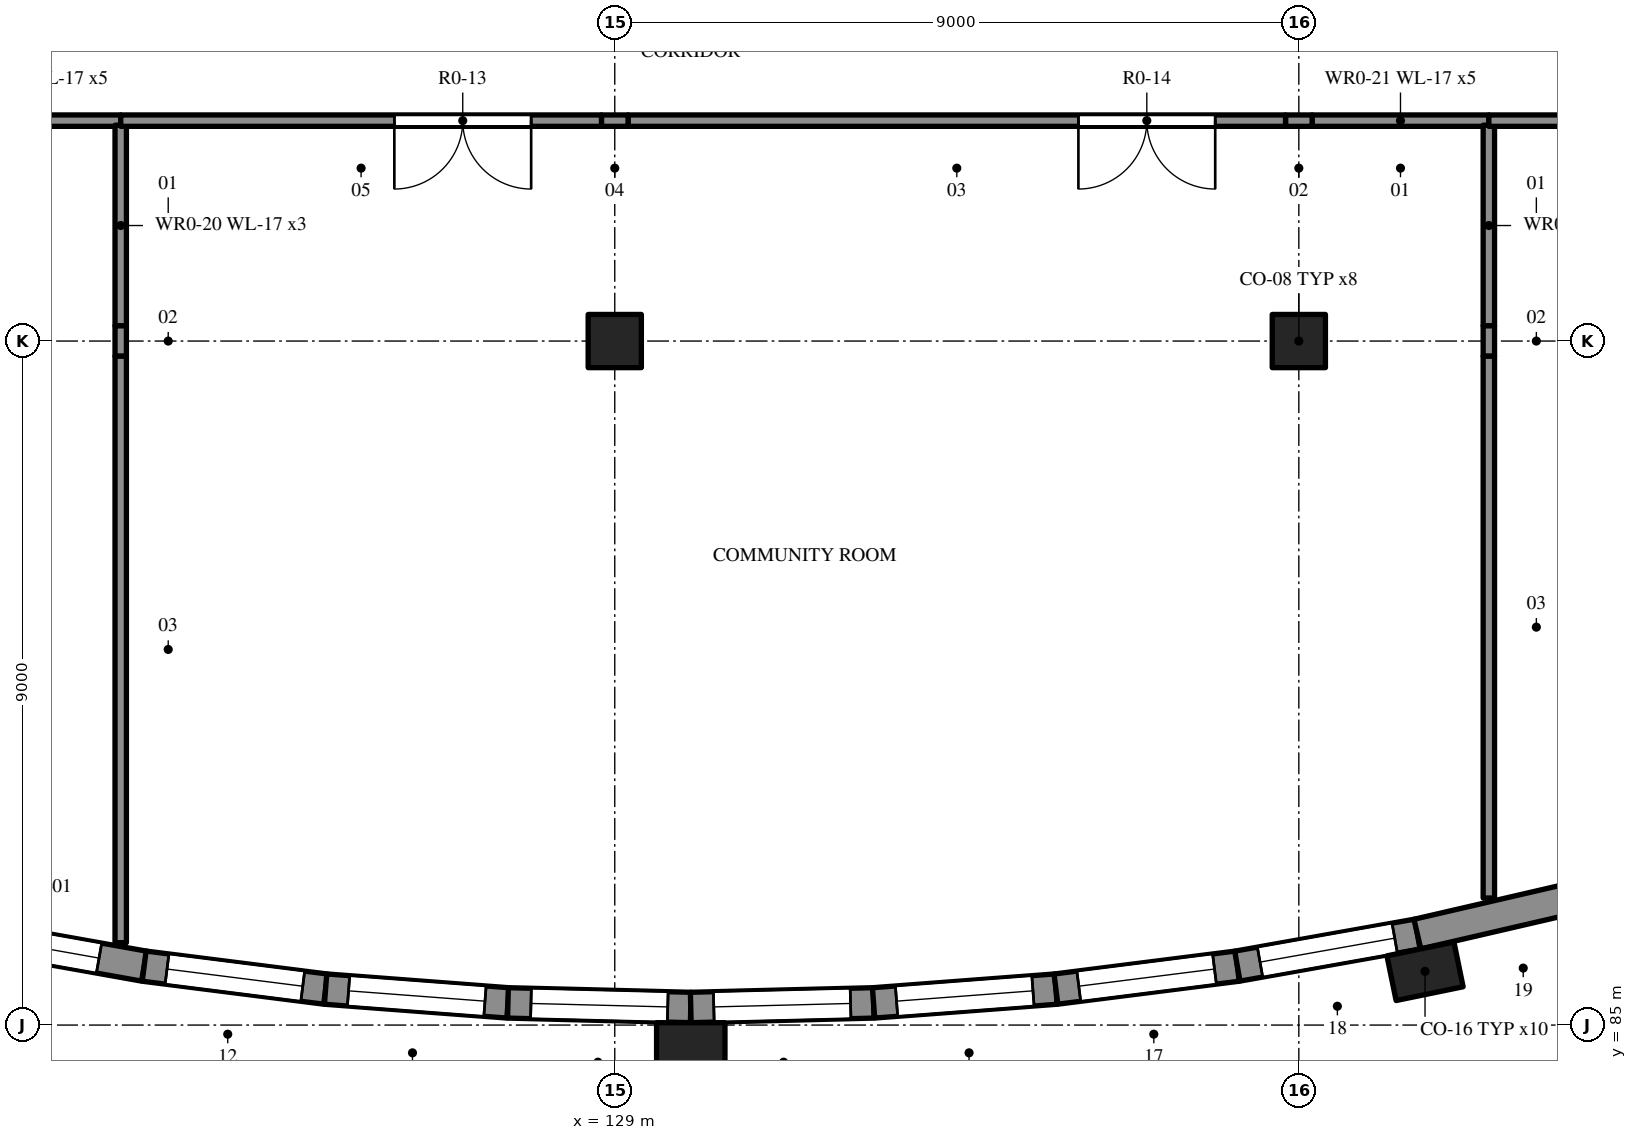
"""IFC4 building model, lengths in metres.
Left out: names, types, materials, properties, quantities, classifications, styles, units other than length and angle.
Written with IfcOpenShell. Run it as: python <this file> out.ifc"""

import sys

from ifc_helpers import new_model, si_unit, direction, frame, frame_2d, origin, origin_2d, place, context, subcontext, project, spatial, rectangle, extrude, element, fill, save


model = new_model("IFC4")
c1 = context("Model", 3, precision=1e-05, world=origin(), true_north=direction((0.0, 1.0)))
c2 = subcontext(c1, "Body", "Model", "MODEL_VIEW")
j1 = project(units=[si_unit("LENGTHUNIT", "METRE"), si_unit("PLANEANGLEUNIT", "RADIAN")], contexts=[c1])
p1 = place(None, origin())
s1 = spatial("IfcSite", under=j1, at=p1, CompositionType="ELEMENT")
p2 = place(p1, origin())
s2 = spatial("IfcBuilding", under=s1, at=p2, CompositionType="ELEMENT")
p3 = place(p2, origin())
s3 = spatial("IfcBuildingStorey", under=s2, at=p3, CompositionType="ELEMENT", Elevation=0.0)
for number, where, z_axis, x_axis in (
    (1, (129.0, 94.0, -0.25), (0.0, 0.0, 1.0), (1.0, 0.0, 0.0)),
    (2, (138.0, 94.0, -0.25), (0.0, 0.0, 1.0), (1.0, 0.0, 0.0)),
):
    element("IfcColumn", number, at=place(p3, frame(where, z_axis=z_axis, x_axis=x_axis)), inside=s3, PredefinedType="COLUMN", context=c2, shape_type="SweptSolid", body=[
        extrude(rectangle(XDim=0.7, YDim=0.7, at=origin_2d()), origin(), (0.0, 0.0, 1.0), 5.37),
    ])
p4 = place(p3, frame((120.44, 86.197, -0.25), z_axis=(0.0, 0.0, 1.0), x_axis=(0.984524011381, -0.175249738987, 0.0)))
e3 = element("IfcWall", 3, at=p4, inside=s3, PredefinedType="SOLIDWALL", context=c2, shape_type="SweptSolid", body=[
    extrude(rectangle(XDim=2.406, YDim=0.4, at=frame_2d((1.203, 0.0))), origin(), (0.0, 0.0, 1.0), 5.65),
])
p5 = place(p4, frame((0.303, 0.0, 1.15)))
e4 = element("IfcOpeningElement", 4, at=p5, cuts=e3, PredefinedType="OPENING", context=c2, shape_type="SweptSolid", body=[
    extrude(rectangle(XDim=1.5, YDim=2.1, at=frame_2d((0.75, 1.05))), frame((0.0, 0.21, 0.0), z_axis=(0.0, -1.0, 0.0), x_axis=(1.0, 0.0, 0.0)), (0.0, 0.0, 1.0), 0.42),
])
p6 = place(p3, frame((122.809, 85.775, -0.25), z_axis=(0.0, 0.0, 1.0), x_axis=(0.99208939311, -0.125533406227, 0.0)))
e5 = element("IfcWall", 5, at=p6, inside=s3, PredefinedType="SOLIDWALL", context=c2, shape_type="SweptSolid", body=[
    extrude(rectangle(XDim=2.406, YDim=0.4, at=frame_2d((1.203, 0.0))), origin(), (0.0, 0.0, 1.0), 5.65),
])
p7 = place(p6, frame((0.303, 0.0, 1.25)))
e6 = element("IfcOpeningElement", 6, at=p7, cuts=e5, PredefinedType="OPENING", context=c2, shape_type="SweptSolid", body=[
    extrude(rectangle(XDim=1.8, YDim=2.1, at=frame_2d((0.9, 1.05))), frame((0.0, 0.21, 0.0), z_axis=(0.0, -1.0, 0.0), x_axis=(1.0, 0.0, 0.0)), (0.0, 0.0, 1.0), 0.42),
])
p8 = place(p3, frame((125.196, 85.473, -0.25), z_axis=(0.0, 0.0, 1.0), x_axis=(0.997146276918, -0.075493724435, 0.0)))
e7 = element("IfcWall", 7, at=p8, inside=s3, PredefinedType="SOLIDWALL", context=c2, shape_type="SweptSolid", body=[
    extrude(rectangle(XDim=2.406, YDim=0.4, at=frame_2d((1.203, 0.0))), origin(), (0.0, 0.0, 1.0), 5.65),
])
p9 = place(p8, frame((0.303, 0.0, 1.25)))
e8 = element("IfcOpeningElement", 8, at=p9, cuts=e7, PredefinedType="OPENING", context=c2, shape_type="SweptSolid", body=[
    extrude(rectangle(XDim=1.8, YDim=2.1, at=frame_2d((0.9, 1.05))), frame((0.0, 0.21, 0.0), z_axis=(0.0, -1.0, 0.0), x_axis=(1.0, 0.0, 0.0)), (0.0, 0.0, 1.0), 0.42),
])
p10 = place(p3, frame((127.595, 85.292, -0.25), z_axis=(0.0, 0.0, 1.0), x_axis=(0.999683321759, -0.025164582196, 0.0)))
e9 = element("IfcWall", 9, at=p10, inside=s3, PredefinedType="SOLIDWALL", context=c2, shape_type="SweptSolid", body=[
    extrude(rectangle(XDim=2.406, YDim=0.4, at=frame_2d((1.203, 0.0))), origin(), (0.0, 0.0, 1.0), 5.65),
])
p11 = place(p10, frame((0.303, 0.0, 1.25)))
e10 = element("IfcOpeningElement", 10, at=p11, cuts=e9, PredefinedType="OPENING", context=c2, shape_type="SweptSolid", body=[
    extrude(rectangle(XDim=1.8, YDim=2.1, at=frame_2d((0.9, 1.05))), frame((0.0, 0.21, 0.0), z_axis=(0.0, -1.0, 0.0), x_axis=(1.0, 0.0, 0.0)), (0.0, 0.0, 1.0), 0.42),
])
p12 = place(p3, frame((130.0, 85.231, -0.25), z_axis=(0.0, 0.0, 1.0), x_axis=(0.999683321759, 0.025164582196, 0.0)))
e11 = element("IfcWall", 11, at=p12, inside=s3, PredefinedType="SOLIDWALL", context=c2, shape_type="SweptSolid", body=[
    extrude(rectangle(XDim=2.406, YDim=0.4, at=frame_2d((1.203, 0.0))), origin(), (0.0, 0.0, 1.0), 5.65),
])
p13 = place(p12, frame((0.303, 0.0, 1.25)))
e12 = element("IfcOpeningElement", 12, at=p13, cuts=e11, PredefinedType="OPENING", context=c2, shape_type="SweptSolid", body=[
    extrude(rectangle(XDim=1.8, YDim=2.1, at=frame_2d((0.9, 1.05))), frame((0.0, 0.21, 0.0), z_axis=(0.0, -1.0, 0.0), x_axis=(1.0, 0.0, 0.0)), (0.0, 0.0, 1.0), 0.42),
])
p14 = place(p3, frame((132.405, 85.292, -0.25), z_axis=(0.0, 0.0, 1.0), x_axis=(0.997146276918, 0.075493724435, 0.0)))
e13 = element("IfcWall", 13, at=p14, inside=s3, PredefinedType="SOLIDWALL", context=c2, shape_type="SweptSolid", body=[
    extrude(rectangle(XDim=2.406, YDim=0.4, at=frame_2d((1.203, 0.0))), origin(), (0.0, 0.0, 1.0), 5.65),
])
p15 = place(p14, frame((0.303, 0.0, 1.25)))
e14 = element("IfcOpeningElement", 14, at=p15, cuts=e13, PredefinedType="OPENING", context=c2, shape_type="SweptSolid", body=[
    extrude(rectangle(XDim=1.8, YDim=2.1, at=frame_2d((0.9, 1.05))), frame((0.0, 0.21, 0.0), z_axis=(0.0, -1.0, 0.0), x_axis=(1.0, 0.0, 0.0)), (0.0, 0.0, 1.0), 0.42),
])
p16 = place(p3, frame((134.804, 85.473, -0.25), z_axis=(0.0, 0.0, 1.0), x_axis=(0.99208939311, 0.125533406227, 0.0)))
e15 = element("IfcWall", 15, at=p16, inside=s3, PredefinedType="SOLIDWALL", context=c2, shape_type="SweptSolid", body=[
    extrude(rectangle(XDim=2.406, YDim=0.4, at=frame_2d((1.203, 0.0))), origin(), (0.0, 0.0, 1.0), 5.65),
])
p17 = place(p16, frame((0.303, 0.0, 1.25)))
e16 = element("IfcOpeningElement", 16, at=p17, cuts=e15, PredefinedType="OPENING", context=c2, shape_type="SweptSolid", body=[
    extrude(rectangle(XDim=1.8, YDim=2.1, at=frame_2d((0.9, 1.05))), frame((0.0, 0.21, 0.0), z_axis=(0.0, -1.0, 0.0), x_axis=(1.0, 0.0, 0.0)), (0.0, 0.0, 1.0), 0.42),
])
p18 = place(p3, frame((137.191, 85.775, -0.25), z_axis=(0.0, 0.0, 1.0), x_axis=(0.984524011381, 0.175249738987, 0.0)))
e17 = element("IfcWall", 17, at=p18, inside=s3, PredefinedType="SOLIDWALL", context=c2, shape_type="SweptSolid", body=[
    extrude(rectangle(XDim=2.406, YDim=0.4, at=frame_2d((1.203, 0.0))), origin(), (0.0, 0.0, 1.0), 5.65),
])
p19 = place(p18, frame((0.303, 0.0, 1.25)))
e18 = element("IfcOpeningElement", 18, at=p19, cuts=e17, PredefinedType="OPENING", context=c2, shape_type="SweptSolid", body=[
    extrude(rectangle(XDim=1.8, YDim=2.1, at=frame_2d((0.9, 1.05))), frame((0.0, 0.21, 0.0), z_axis=(0.0, -1.0, 0.0), x_axis=(1.0, 0.0, 0.0)), (0.0, 0.0, 1.0), 0.42),
])
p20 = place(p3, frame((139.56, 86.197, -0.25), z_axis=(0.0, 0.0, 1.0), x_axis=(0.974210649093, 0.225640446716, 0.0)))
e19 = element("IfcWall", 19, at=p20, inside=s3, PredefinedType="SOLIDWALL", context=c2, shape_type="SweptSolid", body=[
    extrude(rectangle(XDim=2.511, YDim=0.4, at=frame_2d((1.256, 0.0))), origin(), (0.0, 0.0, 1.0), 5.65),
])
for number, where, z_axis, x_axis in (
    (20, (130.0, 84.731, -0.25), (0.0, 0.0, 1.0), (1.0, 0.0, 0.0)),
    (21, (139.66, 85.707, -0.25), (0.0, 0.0, 1.0), (0.98, 0.201, 0.0)),
):
    element("IfcColumn", number, at=place(p3, frame(where, z_axis=z_axis, x_axis=x_axis)), inside=s3, PredefinedType="PILASTER", context=c2, shape_type="SweptSolid", body=[
        extrude(rectangle(XDim=0.9, YDim=0.6, at=origin_2d()), origin(), (0.0, 0.0, 1.0), 5.65),
    ])
p21 = place(p3, frame((122.5, 96.9, 0.0), z_axis=(0.0, 0.0, 1.0), x_axis=(-1.0, 0.0, 0.0)))
e22 = element("IfcWall", 22, at=p21, inside=s3, PredefinedType="PARTITIONING", context=c2, shape_type="SweptSolid", body=[
    extrude(rectangle(XDim=2.325, YDim=0.15, at=frame_2d((1.163, 0.0))), origin(), (0.0, 0.0, 1.0), 5.12),
])
p22 = place(p3, frame((122.5, 96.84, 0.0), z_axis=(0.0, 0.0, 1.0), x_axis=(0.0, -1.0, 0.0)))
e23 = element("IfcWall", 23, at=p22, inside=s3, PredefinedType="PARTITIONING", context=c2, shape_type="SweptSolid", body=[
    extrude(rectangle(XDim=2.64, YDim=0.15, at=frame_2d((1.32, 0.0))), origin(), (0.0, 0.0, 1.0), 5.12),
])
p23 = place(p3, frame((122.5, 94.2, 0.0), z_axis=(0.0, 0.0, 1.0), x_axis=(0.0, -1.0, 0.0)))
e24 = element("IfcWall", 24, at=p23, inside=s3, PredefinedType="PARTITIONING", context=c2, shape_type="SweptSolid", body=[
    extrude(rectangle(XDim=0.4, YDim=0.15, at=frame_2d((0.2, 0.0))), origin(), (0.0, 0.0, 1.0), 4.32),
])
p24 = place(p3, frame((122.5, 93.8, 0.0), z_axis=(0.0, 0.0, 1.0), x_axis=(0.0, -1.0, 0.0)))
e25 = element("IfcWall", 25, at=p24, inside=s3, PredefinedType="PARTITIONING", context=c2, shape_type="SweptSolid", body=[
    extrude(rectangle(XDim=7.716, YDim=0.15, at=frame_2d((3.858, 0.0))), origin(), (0.0, 0.0, 1.0), 5.12),
])
p25 = place(p3, frame((140.5, 96.9, 0.0), z_axis=(0.0, 0.0, 1.0), x_axis=(-1.0, 0.0, 0.0)))
e26 = element("IfcWall", 26, at=p25, inside=s3, PredefinedType="PARTITIONING", context=c2, shape_type="SweptSolid", body=[
    extrude(rectangle(XDim=2.325, YDim=0.15, at=frame_2d((1.163, 0.0))), origin(), (0.0, 0.0, 1.0), 5.12),
])
p26 = place(p3, frame((138.175, 96.9, 0.0), z_axis=(0.0, 0.0, 1.0), x_axis=(-1.0, 0.0, 0.0)))
e27 = element("IfcWall", 27, at=p26, inside=s3, PredefinedType="PARTITIONING", context=c2, shape_type="SweptSolid", body=[
    extrude(rectangle(XDim=0.35, YDim=0.15, at=frame_2d((0.175, 0.0))), origin(), (0.0, 0.0, 1.0), 4.42),
])
p27 = place(p3, frame((137.825, 96.9, 0.0), z_axis=(0.0, 0.0, 1.0), x_axis=(-1.0, 0.0, 0.0)))
e28 = element("IfcWall", 28, at=p27, inside=s3, PredefinedType="PARTITIONING", context=c2, shape_type="SweptSolid", body=[
    extrude(rectangle(XDim=8.65, YDim=0.15, at=frame_2d((4.325, 0.0))), origin(), (0.0, 0.0, 1.0), 5.12),
])
p28 = place(p27, frame((0.925, 0.0, 0.0)))
e29 = element("IfcOpeningElement", 29, at=p28, cuts=e28, PredefinedType="OPENING", context=c2, shape_type="SweptSolid", body=[
    extrude(rectangle(XDim=1.8, YDim=2.1, at=frame_2d((0.9, 1.05))), frame((0.0, 0.085, 0.0), z_axis=(0.0, -1.0, 0.0), x_axis=(1.0, 0.0, 0.0)), (0.0, 0.0, 1.0), 0.17),
])
p29 = place(p3, frame((129.175, 96.9, 0.0), z_axis=(0.0, 0.0, 1.0), x_axis=(-1.0, 0.0, 0.0)))
e30 = element("IfcWall", 30, at=p29, inside=s3, PredefinedType="PARTITIONING", context=c2, shape_type="SweptSolid", body=[
    extrude(rectangle(XDim=0.35, YDim=0.15, at=frame_2d((0.175, 0.0))), origin(), (0.0, 0.0, 1.0), 4.42),
])
p30 = place(p3, frame((128.825, 96.9, 0.0), z_axis=(0.0, 0.0, 1.0), x_axis=(-1.0, 0.0, 0.0)))
e31 = element("IfcWall", 31, at=p30, inside=s3, PredefinedType="PARTITIONING", context=c2, shape_type="SweptSolid", body=[
    extrude(rectangle(XDim=6.325, YDim=0.15, at=frame_2d((3.163, 0.0))), origin(), (0.0, 0.0, 1.0), 5.12),
])
p31 = place(p30, frame((0.925, 0.0, 0.0)))
e32 = element("IfcOpeningElement", 32, at=p31, cuts=e31, PredefinedType="OPENING", context=c2, shape_type="SweptSolid", body=[
    extrude(rectangle(XDim=1.8, YDim=2.1, at=frame_2d((0.9, 1.05))), frame((0.0, 0.085, 0.0), z_axis=(0.0, -1.0, 0.0), x_axis=(1.0, 0.0, 0.0)), (0.0, 0.0, 1.0), 0.17),
])
p32 = place(p3, frame((140.5, 96.84, 0.0), z_axis=(0.0, 0.0, 1.0), x_axis=(0.0, -1.0, 0.0)))
e33 = element("IfcWall", 33, at=p32, inside=s3, PredefinedType="PARTITIONING", context=c2, shape_type="SweptSolid", body=[
    extrude(rectangle(XDim=2.64, YDim=0.15, at=frame_2d((1.32, 0.0))), origin(), (0.0, 0.0, 1.0), 5.12),
])
p33 = place(p3, frame((140.5, 94.2, 0.0), z_axis=(0.0, 0.0, 1.0), x_axis=(0.0, -1.0, 0.0)))
e34 = element("IfcWall", 34, at=p33, inside=s3, PredefinedType="PARTITIONING", context=c2, shape_type="SweptSolid", body=[
    extrude(rectangle(XDim=0.4, YDim=0.15, at=frame_2d((0.2, 0.0))), origin(), (0.0, 0.0, 1.0), 4.32),
])
p34 = place(p3, frame((140.5, 93.8, 0.0), z_axis=(0.0, 0.0, 1.0), x_axis=(0.0, -1.0, 0.0)))
e35 = element("IfcWall", 35, at=p34, inside=s3, PredefinedType="PARTITIONING", context=c2, shape_type="SweptSolid", body=[
    extrude(rectangle(XDim=7.129, YDim=0.15, at=frame_2d((3.564, 0.0))), origin(), (0.0, 0.0, 1.0), 5.12),
])
p35 = place(p3, frame((146.825, 96.9, 0.0), z_axis=(0.0, 0.0, 1.0), x_axis=(-1.0, 0.0, 0.0)))
e36 = element("IfcWall", 36, at=p35, inside=s3, PredefinedType="PARTITIONING", context=c2, shape_type="SweptSolid", body=[
    extrude(rectangle(XDim=6.325, YDim=0.15, at=frame_2d((3.163, 0.0))), origin(), (0.0, 0.0, 1.0), 5.12),
])
p36 = place(p35, frame((0.975, 0.0, 0.0)))
e37 = element("IfcOpeningElement", 37, at=p36, cuts=e36, PredefinedType="OPENING", context=c2, shape_type="SweptSolid", body=[
    extrude(rectangle(XDim=1.1, YDim=2.1, at=frame_2d((0.55, 1.05))), frame((0.0, 0.085, 0.0), z_axis=(0.0, -1.0, 0.0), x_axis=(1.0, 0.0, 0.0)), (0.0, 0.0, 1.0), 0.17),
])
p37 = place(p5, origin())
e38 = element("IfcWindow", 38, at=p37, inside=s3, PartitioningType="SINGLE_PANEL", PredefinedType="WINDOW", context=c2, shape_type="SweptSolid", body=[
    extrude(rectangle(XDim=1.5, YDim=2.1, at=frame_2d((0.75, 1.05))), frame((0.0, 0.03, 0.0), z_axis=(0.0, -1.0, 0.0), x_axis=(1.0, 0.0, 0.0)), (0.0, 0.0, 1.0), 0.06),
])
fill(e4, e38)
p38 = place(p7, origin())
e39 = element("IfcWindow", 39, at=p38, inside=s3, PartitioningType="SINGLE_PANEL", PredefinedType="WINDOW", context=c2, shape_type="SweptSolid", body=[
    extrude(rectangle(XDim=1.8, YDim=2.1, at=frame_2d((0.9, 1.05))), frame((0.0, 0.03, 0.0), z_axis=(0.0, -1.0, 0.0), x_axis=(1.0, 0.0, 0.0)), (0.0, 0.0, 1.0), 0.06),
])
fill(e6, e39)
p39 = place(p9, origin())
e40 = element("IfcWindow", 40, at=p39, inside=s3, PartitioningType="SINGLE_PANEL", PredefinedType="WINDOW", context=c2, shape_type="SweptSolid", body=[
    extrude(rectangle(XDim=1.8, YDim=2.1, at=frame_2d((0.9, 1.05))), frame((0.0, 0.03, 0.0), z_axis=(0.0, -1.0, 0.0), x_axis=(1.0, 0.0, 0.0)), (0.0, 0.0, 1.0), 0.06),
])
fill(e8, e40)
p40 = place(p11, origin())
e41 = element("IfcWindow", 41, at=p40, inside=s3, PartitioningType="SINGLE_PANEL", PredefinedType="WINDOW", context=c2, shape_type="SweptSolid", body=[
    extrude(rectangle(XDim=1.8, YDim=2.1, at=frame_2d((0.9, 1.05))), frame((0.0, 0.03, 0.0), z_axis=(0.0, -1.0, 0.0), x_axis=(1.0, 0.0, 0.0)), (0.0, 0.0, 1.0), 0.06),
])
fill(e10, e41)
p41 = place(p13, origin())
e42 = element("IfcWindow", 42, at=p41, inside=s3, PartitioningType="SINGLE_PANEL", PredefinedType="WINDOW", context=c2, shape_type="SweptSolid", body=[
    extrude(rectangle(XDim=1.8, YDim=2.1, at=frame_2d((0.9, 1.05))), frame((0.0, 0.03, 0.0), z_axis=(0.0, -1.0, 0.0), x_axis=(1.0, 0.0, 0.0)), (0.0, 0.0, 1.0), 0.06),
])
fill(e12, e42)
p42 = place(p15, origin())
e43 = element("IfcWindow", 43, at=p42, inside=s3, PartitioningType="SINGLE_PANEL", PredefinedType="WINDOW", context=c2, shape_type="SweptSolid", body=[
    extrude(rectangle(XDim=1.8, YDim=2.1, at=frame_2d((0.9, 1.05))), frame((0.0, 0.03, 0.0), z_axis=(0.0, -1.0, 0.0), x_axis=(1.0, 0.0, 0.0)), (0.0, 0.0, 1.0), 0.06),
])
fill(e14, e43)
p43 = place(p17, origin())
e44 = element("IfcWindow", 44, at=p43, inside=s3, PartitioningType="SINGLE_PANEL", PredefinedType="WINDOW", context=c2, shape_type="SweptSolid", body=[
    extrude(rectangle(XDim=1.8, YDim=2.1, at=frame_2d((0.9, 1.05))), frame((0.0, 0.03, 0.0), z_axis=(0.0, -1.0, 0.0), x_axis=(1.0, 0.0, 0.0)), (0.0, 0.0, 1.0), 0.06),
])
fill(e16, e44)
p44 = place(p19, origin())
e45 = element("IfcWindow", 45, at=p44, inside=s3, PartitioningType="SINGLE_PANEL", PredefinedType="WINDOW", context=c2, shape_type="SweptSolid", body=[
    extrude(rectangle(XDim=1.8, YDim=2.1, at=frame_2d((0.9, 1.05))), frame((0.0, 0.03, 0.0), z_axis=(0.0, -1.0, 0.0), x_axis=(1.0, 0.0, 0.0)), (0.0, 0.0, 1.0), 0.06),
])
fill(e18, e45)
p45 = place(p31, origin())
e46 = element("IfcDoor", 46, at=p45, inside=s3, OperationType="DOUBLE_DOOR_SINGLE_SWING", PredefinedType="DOOR", context=c2, shape_type="SweptSolid", body=[
    extrude(rectangle(XDim=1.8, YDim=2.1, at=frame_2d((0.9, 1.05))), frame((0.0, 0.025, 0.0), z_axis=(0.0, -1.0, 0.0), x_axis=(1.0, 0.0, 0.0)), (0.0, 0.0, 1.0), 0.05),
])
fill(e32, e46)
p46 = place(p28, origin())
e47 = element("IfcDoor", 47, at=p46, inside=s3, OperationType="DOUBLE_DOOR_SINGLE_SWING", PredefinedType="DOOR", context=c2, shape_type="SweptSolid", body=[
    extrude(rectangle(XDim=1.8, YDim=2.1, at=frame_2d((0.9, 1.05))), frame((0.0, 0.025, 0.0), z_axis=(0.0, -1.0, 0.0), x_axis=(1.0, 0.0, 0.0)), (0.0, 0.0, 1.0), 0.05),
])
fill(e29, e47)
save(model, sys.argv[1])
